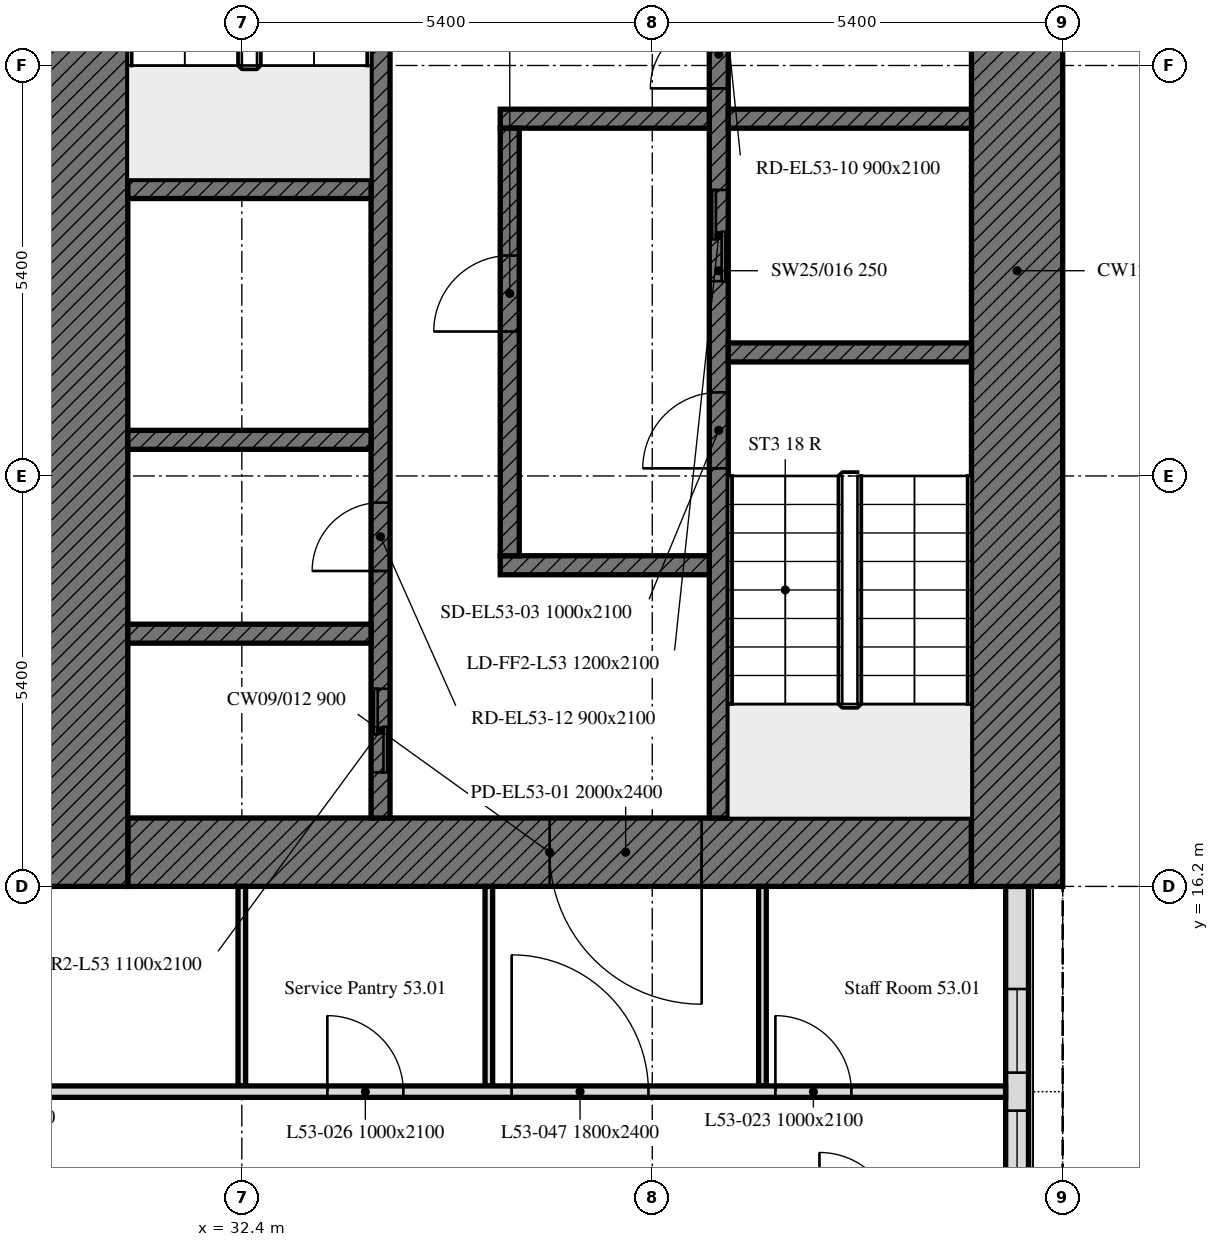
"""IFC4 building model, lengths in metres.
Left out: names, types, materials, properties, quantities, classifications, styles, units other than length and angle.
Written with IfcOpenShell. Run it as: python <this file> out.ifc"""

import sys

from ifc_helpers import new_model, si_unit, direction, frame, frame_2d, origin, place, context, subcontext, project, spatial, rectangle, extrude, element, fill, save


model = new_model("IFC4")
c1 = context("Model", 3, precision=1e-05, world=origin(), true_north=direction((0.0, 1.0)))
c2 = subcontext(c1, "Body", "Model", "MODEL_VIEW")
j1 = project(units=[si_unit("LENGTHUNIT", "METRE"), si_unit("PLANEANGLEUNIT", "RADIAN")], contexts=[c1])
p1 = place(None, origin())
s1 = spatial("IfcSite", under=j1, at=p1, CompositionType="ELEMENT")
p2 = place(p1, origin())
s2 = spatial("IfcBuilding", under=s1, at=p2, CompositionType="ELEMENT")
p3 = place(p2, frame((0.0, 0.0, 213.7)))
s3 = spatial("IfcBuildingStorey", under=s2, at=p3, CompositionType="ELEMENT", Elevation=213.7)
p4 = place(p3, frame((42.6, 10.986, 0.0), z_axis=(0.0, 0.0, 1.0), x_axis=(0.0, 1.0, 0.0)))
e1 = element("IfcWall", 1, at=p4, inside=s3, PredefinedType="SOLIDWALL", context=c2, shape_type="SweptSolid", body=[
    extrude(rectangle(XDim=5.214, YDim=0.3, at=frame_2d((2.607, 0.0))), origin(), (0.0, 0.0, 1.0), 3.0),
])
p5 = place(p4, frame((1.164, 0.0, 0.9)))
e2 = element("IfcOpeningElement", 2, at=p5, cuts=e1, PredefinedType="OPENING", context=c2, shape_type="SweptSolid", body=[
    extrude(rectangle(XDim=1.1, YDim=1.7, at=frame_2d((0.55, 0.85))), frame((0.0, 0.16, 0.0), z_axis=(0.0, -1.0, 0.0), x_axis=(1.0, 0.0, 0.0)), (0.0, 0.0, 1.0), 0.32),
])
p6 = place(p4, frame((2.764, 0.0, 0.9)))
e3 = element("IfcOpeningElement", 3, at=p6, cuts=e1, PredefinedType="OPENING", context=c2, shape_type="SweptSolid", body=[
    extrude(rectangle(XDim=1.1, YDim=1.7, at=frame_2d((0.55, 0.85))), frame((0.0, 0.16, 0.0), z_axis=(0.0, -1.0, 0.0), x_axis=(1.0, 0.0, 0.0)), (0.0, 0.0, 1.0), 0.32),
])
p7 = place(p3, frame((42.0, 16.65, 0.0), z_axis=(0.0, 0.0, 1.0), x_axis=(-1.0, 0.0, 0.0)))
e4 = element("IfcWall", 4, at=p7, inside=s3, PredefinedType="SOLIDWALL", context=c2, shape_type="SweptSolid", body=[
    extrude(rectangle(XDim=11.1, YDim=0.9, at=frame_2d((5.55, 0.0))), origin(), (0.0, 0.0, 1.0), 3.0),
])
p8 = place(p7, frame((3.55, 0.0, 0.0)))
e5 = element("IfcOpeningElement", 5, at=p8, cuts=e4, PredefinedType="OPENING", context=c2, shape_type="SweptSolid", body=[
    extrude(rectangle(XDim=2.0, YDim=2.4, at=frame_2d((1.0, 1.2))), frame((0.0, 0.45, 0.0), z_axis=(0.0, -1.0, 0.0), x_axis=(1.0, 0.0, 0.0)), (0.0, 0.0, 1.0), 0.9),
])
for number, where, z_axis, x_axis in (
    (6, (42.6, 32.4, 0.0), (0.0, 0.0, 1.0), (0.0, -1.0, 0.0)),
    (7, (30.3, 16.2, 0.0), (0.0, 0.0, 1.0), (0.0, 1.0, 0.0)),
):
    element("IfcWall", number, at=place(p3, frame(where, z_axis=z_axis, x_axis=x_axis)), inside=s3, PredefinedType="SOLIDWALL", context=c2, shape_type="SweptSolid", body=[
        extrude(rectangle(XDim=16.2, YDim=1.2, at=frame_2d((8.1, 0.0))), origin(), (0.0, 0.0, 1.0), 3.0),
    ])
p9 = place(p3, frame((38.675, 17.1, 0.0), z_axis=(0.0, 0.0, 1.0), x_axis=(0.0, 1.0, 0.0)))
e8 = element("IfcWall", 8, at=p9, inside=s3, PredefinedType="SOLIDWALL", context=c2, shape_type="SweptSolid", body=[
    extrude(rectangle(XDim=14.4, YDim=0.25, at=frame_2d((7.2, 0.0))), origin(), (0.0, 0.0, 1.0), 3.0),
])
p10 = place(p9, frame((4.6, 0.0, 0.0)))
e9 = element("IfcOpeningElement", 9, at=p10, cuts=e8, PredefinedType="OPENING", context=c2, shape_type="SweptSolid", body=[
    extrude(rectangle(XDim=1.0, YDim=2.1, at=frame_2d((0.5, 1.05))), frame((0.0, 0.125, 0.0), z_axis=(0.0, -1.0, 0.0), x_axis=(1.0, 0.0, 0.0)), (0.0, 0.0, 1.0), 0.25),
])
p11 = place(p9, frame((7.062, 0.0, 0.0)))
e10 = element("IfcOpeningElement", 10, at=p11, cuts=e8, PredefinedType="OPENING", context=c2, shape_type="SweptSolid", body=[
    extrude(rectangle(XDim=1.2, YDim=2.1, at=frame_2d((0.6, 1.05))), frame((0.0, 0.125, 0.0), z_axis=(0.0, -1.0, 0.0), x_axis=(1.0, 0.0, 0.0)), (0.0, 0.0, 1.0), 0.25),
])
p12 = place(p9, frame((9.599, 0.0, 0.0)))
e11 = element("IfcOpeningElement", 11, at=p12, cuts=e8, PredefinedType="OPENING", context=c2, shape_type="SweptSolid", body=[
    extrude(rectangle(XDim=0.9, YDim=2.1, at=frame_2d((0.45, 1.05))), frame((0.0, 0.125, 0.0), z_axis=(0.0, -1.0, 0.0), x_axis=(1.0, 0.0, 0.0)), (0.0, 0.0, 1.0), 0.25),
])
p13 = place(p9, frame((11.032, 0.0, 0.0)))
e12 = element("IfcOpeningElement", 12, at=p13, cuts=e8, PredefinedType="OPENING", context=c2, shape_type="SweptSolid", body=[
    extrude(rectangle(XDim=0.9, YDim=2.1, at=frame_2d((0.45, 1.05))), frame((0.0, 0.125, 0.0), z_axis=(0.0, -1.0, 0.0), x_axis=(1.0, 0.0, 0.0)), (0.0, 0.0, 1.0), 0.25),
])
p14 = place(p9, frame((12.846, 0.0, 0.0)))
e13 = element("IfcOpeningElement", 13, at=p14, cuts=e8, PredefinedType="OPENING", context=c2, shape_type="SweptSolid", body=[
    extrude(rectangle(XDim=0.9, YDim=2.1, at=frame_2d((0.45, 1.05))), frame((0.0, 0.125, 0.0), z_axis=(0.0, -1.0, 0.0), x_axis=(1.0, 0.0, 0.0)), (0.0, 0.0, 1.0), 0.25),
])
p15 = place(p3, frame((34.225, 17.1, 0.0), z_axis=(0.0, 0.0, 1.0), x_axis=(0.0, 1.0, 0.0)))
e14 = element("IfcWall", 14, at=p15, inside=s3, PredefinedType="SOLIDWALL", context=c2, shape_type="SweptSolid", body=[
    extrude(rectangle(XDim=14.4, YDim=0.25, at=frame_2d((7.2, 0.0))), origin(), (0.0, 0.0, 1.0), 3.0),
])
p16 = place(p15, frame((13.15, 0.0, 0.0)))
e15 = element("IfcOpeningElement", 15, at=p16, cuts=e14, PredefinedType="OPENING", context=c2, shape_type="SweptSolid", body=[
    extrude(rectangle(XDim=1.0, YDim=2.1, at=frame_2d((0.5, 1.05))), frame((0.0, 0.125, 0.0), z_axis=(0.0, -1.0, 0.0), x_axis=(1.0, 0.0, 0.0)), (0.0, 0.0, 1.0), 0.25),
])
p17 = place(p15, frame((0.6, 0.0, 0.0)))
e16 = element("IfcOpeningElement", 16, at=p17, cuts=e14, PredefinedType="OPENING", context=c2, shape_type="SweptSolid", body=[
    extrude(rectangle(XDim=1.1, YDim=2.1, at=frame_2d((0.55, 1.05))), frame((0.0, 0.125, 0.0), z_axis=(0.0, -1.0, 0.0), x_axis=(1.0, 0.0, 0.0)), (0.0, 0.0, 1.0), 0.25),
])
p18 = place(p15, frame((3.25, 0.0, 0.0)))
e17 = element("IfcOpeningElement", 17, at=p18, cuts=e14, PredefinedType="OPENING", context=c2, shape_type="SweptSolid", body=[
    extrude(rectangle(XDim=0.9, YDim=2.1, at=frame_2d((0.45, 1.05))), frame((0.0, 0.125, 0.0), z_axis=(0.0, -1.0, 0.0), x_axis=(1.0, 0.0, 0.0)), (0.0, 0.0, 1.0), 0.25),
])
p19 = place(p3, frame((38.8, 23.225, 0.0), z_axis=(0.0, 0.0, 1.0), x_axis=(1.0, 0.0, 0.0)))
e18 = element("IfcWall", 18, at=p19, inside=s3, PredefinedType="SOLIDWALL", context=c2, shape_type="SweptSolid", body=[
    extrude(rectangle(XDim=3.2, YDim=0.25, at=frame_2d((1.6, 0.0))), origin(), (0.0, 0.0, 1.0), 3.0),
])
for number, where, z_axis, x_axis in (
    (19, (30.9, 25.375, 0.0), (0.0, 0.0, 1.0), (1.0, 0.0, 0.0)),
    (20, (30.9, 22.075, 0.0), (0.0, 0.0, 1.0), (1.0, 0.0, 0.0)),
):
    element("IfcWall", number, at=place(p3, frame(where, z_axis=z_axis, x_axis=x_axis)), inside=s3, PredefinedType="SOLIDWALL", context=c2, shape_type="SweptSolid", body=[
        extrude(rectangle(XDim=3.2, YDim=0.25, at=frame_2d((1.6, 0.0))), origin(), (0.0, 0.0, 1.0), 3.0),
    ])
p20 = place(p3, frame((38.8, 26.3, 0.0), z_axis=(0.0, 0.0, 1.0), x_axis=(1.0, 0.0, 0.0)))
e21 = element("IfcWall", 21, at=p20, inside=s3, PredefinedType="SOLIDWALL", context=c2, shape_type="SweptSolid", body=[
    extrude(rectangle(XDim=3.2, YDim=0.25, at=frame_2d((1.6, 0.0))), origin(), (0.0, 0.0, 1.0), 3.0),
])
for number, where, z_axis, x_axis in (
    (22, (35.8, 26.3, 0.0), (0.0, 0.0, 1.0), (1.0, 0.0, 0.0)),
    (23, (35.8, 20.425, 0.0), (0.0, 0.0, 1.0), (1.0, 0.0, 0.0)),
):
    element("IfcWall", number, at=place(p3, frame(where, z_axis=z_axis, x_axis=x_axis)), inside=s3, PredefinedType="SOLIDWALL", context=c2, shape_type="SweptSolid", body=[
        extrude(rectangle(XDim=2.75, YDim=0.25, at=frame_2d((1.375, 0.0))), origin(), (0.0, 0.0, 1.0), 3.0),
    ])
p21 = place(p3, frame((35.925, 20.55, 0.0), z_axis=(0.0, 0.0, 1.0), x_axis=(0.0, 1.0, 0.0)))
e24 = element("IfcWall", 24, at=p21, inside=s3, PredefinedType="SOLIDWALL", context=c2, shape_type="SweptSolid", body=[
    extrude(rectangle(XDim=5.625, YDim=0.25, at=frame_2d((2.812, 0.0))), origin(), (0.0, 0.0, 1.0), 3.0),
])
p22 = place(p21, frame((2.95, 0.0, 0.0)))
e25 = element("IfcOpeningElement", 25, at=p22, cuts=e24, PredefinedType="OPENING", context=c2, shape_type="SweptSolid", body=[
    extrude(rectangle(XDim=1.0, YDim=2.1, at=frame_2d((0.5, 1.05))), frame((0.0, 0.125, 0.0), z_axis=(0.0, -1.0, 0.0), x_axis=(1.0, 0.0, 0.0)), (0.0, 0.0, 1.0), 0.25),
])
p23 = place(p3, frame((30.9, 19.525, 0.0), z_axis=(0.0, 0.0, 1.0), x_axis=(1.0, 0.0, 0.0)))
e26 = element("IfcWall", 26, at=p23, inside=s3, PredefinedType="SOLIDWALL", context=c2, shape_type="SweptSolid", body=[
    extrude(rectangle(XDim=3.2, YDim=0.25, at=frame_2d((1.6, 0.0))), origin(), (0.0, 0.0, 1.0), 3.0),
])
for number, where, z_axis, x_axis in (
    (27, (32.4, 13.575, 0.0), (0.0, 0.0, 1.0), (0.0, 1.0, 0.0)),
    (28, (39.25, 13.575, 0.0), (0.0, 0.0, 1.0), (0.0, 1.0, 0.0)),
    (29, (35.65, 16.2, 0.0), (0.0, 0.0, 1.0), (0.0, -1.0, 0.0)),
):
    element("IfcWall", number, at=place(p3, frame(where, z_axis=z_axis, x_axis=x_axis)), inside=s3, PredefinedType="PARTITIONING", context=c2, shape_type="SweptSolid", body=[
        extrude(rectangle(XDim=2.625, YDim=0.1, at=frame_2d((1.312, 0.0))), origin(), (0.0, 0.0, 1.0), 3.0),
    ])
p24 = place(p3, frame((16.3, 13.5, 0.0), z_axis=(0.0, 0.0, 1.0), x_axis=(1.0, 0.0, 0.0)))
e30 = element("IfcWall", 30, at=p24, inside=s3, PredefinedType="PARTITIONING", context=c2, shape_type="SweptSolid", body=[
    extrude(rectangle(XDim=26.149, YDim=0.15, at=frame_2d((13.074, 0.0))), origin(), (0.0, 0.0, 1.0), 3.0),
])
p25 = place(p24, frame((7.5, 0.0, 0.0)))
e31 = element("IfcOpeningElement", 31, at=p25, cuts=e30, PredefinedType="OPENING", context=c2, shape_type="SweptSolid", body=[
    extrude(rectangle(XDim=1.0, YDim=2.1, at=frame_2d((0.5, 1.05))), frame((0.0, 0.075, 0.0), z_axis=(0.0, -1.0, 0.0), x_axis=(1.0, 0.0, 0.0)), (0.0, 0.0, 1.0), 0.15),
])
p26 = place(p24, frame((23.12, 0.0, 0.0)))
e32 = element("IfcOpeningElement", 32, at=p26, cuts=e30, PredefinedType="OPENING", context=c2, shape_type="SweptSolid", body=[
    extrude(rectangle(XDim=1.0, YDim=2.1, at=frame_2d((0.5, 1.05))), frame((0.0, 0.075, 0.0), z_axis=(0.0, -1.0, 0.0), x_axis=(1.0, 0.0, 0.0)), (0.0, 0.0, 1.0), 0.15),
])
p27 = place(p24, frame((17.225, 0.0, 0.0)))
e33 = element("IfcOpeningElement", 33, at=p27, cuts=e30, PredefinedType="OPENING", context=c2, shape_type="SweptSolid", body=[
    extrude(rectangle(XDim=1.0, YDim=2.1, at=frame_2d((0.5, 1.05))), frame((0.0, 0.075, 0.0), z_axis=(0.0, -1.0, 0.0), x_axis=(1.0, 0.0, 0.0)), (0.0, 0.0, 1.0), 0.15),
])
p28 = place(p24, frame((19.65, 0.0, 0.0)))
e34 = element("IfcOpeningElement", 34, at=p28, cuts=e30, PredefinedType="OPENING", context=c2, shape_type="SweptSolid", body=[
    extrude(rectangle(XDim=1.8, YDim=2.4, at=frame_2d((0.9, 1.2))), frame((0.0, 0.075, 0.0), z_axis=(0.0, -1.0, 0.0), x_axis=(1.0, 0.0, 0.0)), (0.0, 0.0, 1.0), 0.15),
])
p29 = place(p5, origin())
e35 = element("IfcWindow", 35, at=p29, inside=s3, PartitioningType="SINGLE_PANEL", PredefinedType="WINDOW", context=c2, shape_type="SweptSolid", body=[
    extrude(rectangle(XDim=1.1, YDim=1.7, at=frame_2d((0.55, 0.85))), frame((0.0, 0.03, 0.0), z_axis=(0.0, -1.0, 0.0), x_axis=(1.0, 0.0, 0.0)), (0.0, 0.0, 1.0), 0.06),
])
fill(e2, e35)
p30 = place(p6, origin())
e36 = element("IfcWindow", 36, at=p30, inside=s3, PartitioningType="SINGLE_PANEL", PredefinedType="WINDOW", context=c2, shape_type="SweptSolid", body=[
    extrude(rectangle(XDim=1.1, YDim=1.7, at=frame_2d((0.55, 0.85))), frame((0.0, 0.03, 0.0), z_axis=(0.0, -1.0, 0.0), x_axis=(1.0, 0.0, 0.0)), (0.0, 0.0, 1.0), 0.06),
])
fill(e3, e36)
p31 = place(p8, origin())
e37 = element("IfcDoor", 37, at=p31, inside=s3, OperationType="DOUBLE_DOOR_SINGLE_SWING", PredefinedType="DOOR", context=c2, shape_type="SweptSolid", body=[
    extrude(rectangle(XDim=2.0, YDim=2.4, at=frame_2d((1.0, 1.2))), frame((0.0, 0.025, 0.0), z_axis=(0.0, -1.0, 0.0), x_axis=(1.0, 0.0, 0.0)), (0.0, 0.0, 1.0), 0.05),
])
fill(e5, e37)
p32 = place(p10, origin())
e38 = element("IfcDoor", 38, at=p32, inside=s3, OperationType="SINGLE_SWING_LEFT", PredefinedType="DOOR", context=c2, shape_type="SweptSolid", body=[
    extrude(rectangle(XDim=1.0, YDim=2.1, at=frame_2d((0.5, 1.05))), frame((0.0, 0.025, 0.0), z_axis=(0.0, -1.0, 0.0), x_axis=(1.0, 0.0, 0.0)), (0.0, 0.0, 1.0), 0.05),
])
fill(e9, e38)
p33 = place(p22, origin())
e39 = element("IfcDoor", 39, at=p33, inside=s3, OperationType="SINGLE_SWING_LEFT", PredefinedType="DOOR", context=c2, shape_type="SweptSolid", body=[
    extrude(rectangle(XDim=1.0, YDim=2.1, at=frame_2d((0.5, 1.05))), frame((0.0, 0.025, 0.0), z_axis=(0.0, -1.0, 0.0), x_axis=(1.0, 0.0, 0.0)), (0.0, 0.0, 1.0), 0.05),
])
fill(e25, e39)
p34 = place(p11, origin())
e40 = element("IfcDoor", 40, at=p34, inside=s3, OperationType="DOUBLE_DOOR_SLIDING", PredefinedType="DOOR", context=c2, shape_type="SweptSolid", body=[
    extrude(rectangle(XDim=1.2, YDim=2.1, at=frame_2d((0.6, 1.05))), frame((0.0, 0.025, 0.0), z_axis=(0.0, -1.0, 0.0), x_axis=(1.0, 0.0, 0.0)), (0.0, 0.0, 1.0), 0.05),
])
fill(e10, e40)
p35 = place(p17, origin())
e41 = element("IfcDoor", 41, at=p35, inside=s3, OperationType="DOUBLE_DOOR_SLIDING", PredefinedType="DOOR", context=c2, shape_type="SweptSolid", body=[
    extrude(rectangle(XDim=1.1, YDim=2.1, at=frame_2d((0.55, 1.05))), frame((0.0, 0.025, 0.0), z_axis=(0.0, -1.0, 0.0), x_axis=(1.0, 0.0, 0.0)), (0.0, 0.0, 1.0), 0.05),
])
fill(e16, e41)
p36 = place(p12, origin())
e42 = element("IfcDoor", 42, at=p36, inside=s3, OperationType="SINGLE_SWING_LEFT", PredefinedType="DOOR", context=c2, shape_type="SweptSolid", body=[
    extrude(rectangle(XDim=0.9, YDim=2.1, at=frame_2d((0.45, 1.05))), frame((0.0, 0.025, 0.0), z_axis=(0.0, -1.0, 0.0), x_axis=(1.0, 0.0, 0.0)), (0.0, 0.0, 1.0), 0.05),
])
fill(e11, e42)
p37 = place(p18, origin())
e43 = element("IfcDoor", 43, at=p37, inside=s3, OperationType="SINGLE_SWING_LEFT", PredefinedType="DOOR", context=c2, shape_type="SweptSolid", body=[
    extrude(rectangle(XDim=0.9, YDim=2.1, at=frame_2d((0.45, 1.05))), frame((0.0, 0.025, 0.0), z_axis=(0.0, -1.0, 0.0), x_axis=(1.0, 0.0, 0.0)), (0.0, 0.0, 1.0), 0.05),
])
fill(e17, e43)
p38 = place(p26, origin())
e44 = element("IfcDoor", 44, at=p38, inside=s3, OperationType="SINGLE_SWING_RIGHT", PredefinedType="DOOR", context=c2, shape_type="SweptSolid", body=[
    extrude(rectangle(XDim=1.0, YDim=2.1, at=frame_2d((0.5, 1.05))), frame((0.0, 0.025, 0.0), z_axis=(0.0, -1.0, 0.0), x_axis=(1.0, 0.0, 0.0)), (0.0, 0.0, 1.0), 0.05),
])
fill(e32, e44)
p39 = place(p27, origin())
e45 = element("IfcDoor", 45, at=p39, inside=s3, OperationType="SINGLE_SWING_LEFT", PredefinedType="DOOR", context=c2, shape_type="SweptSolid", body=[
    extrude(rectangle(XDim=1.0, YDim=2.1, at=frame_2d((0.5, 1.05))), frame((0.0, 0.025, 0.0), z_axis=(0.0, -1.0, 0.0), x_axis=(1.0, 0.0, 0.0)), (0.0, 0.0, 1.0), 0.05),
])
fill(e33, e45)
p40 = place(p28, origin())
e46 = element("IfcDoor", 46, at=p40, inside=s3, OperationType="DOUBLE_DOOR_SINGLE_SWING", PredefinedType="DOOR", context=c2, shape_type="SweptSolid", body=[
    extrude(rectangle(XDim=1.8, YDim=2.4, at=frame_2d((0.9, 1.2))), frame((0.0, 0.025, 0.0), z_axis=(0.0, -1.0, 0.0), x_axis=(1.0, 0.0, 0.0)), (0.0, 0.0, 1.0), 0.05),
])
fill(e34, e46)
save(model, sys.argv[1])
